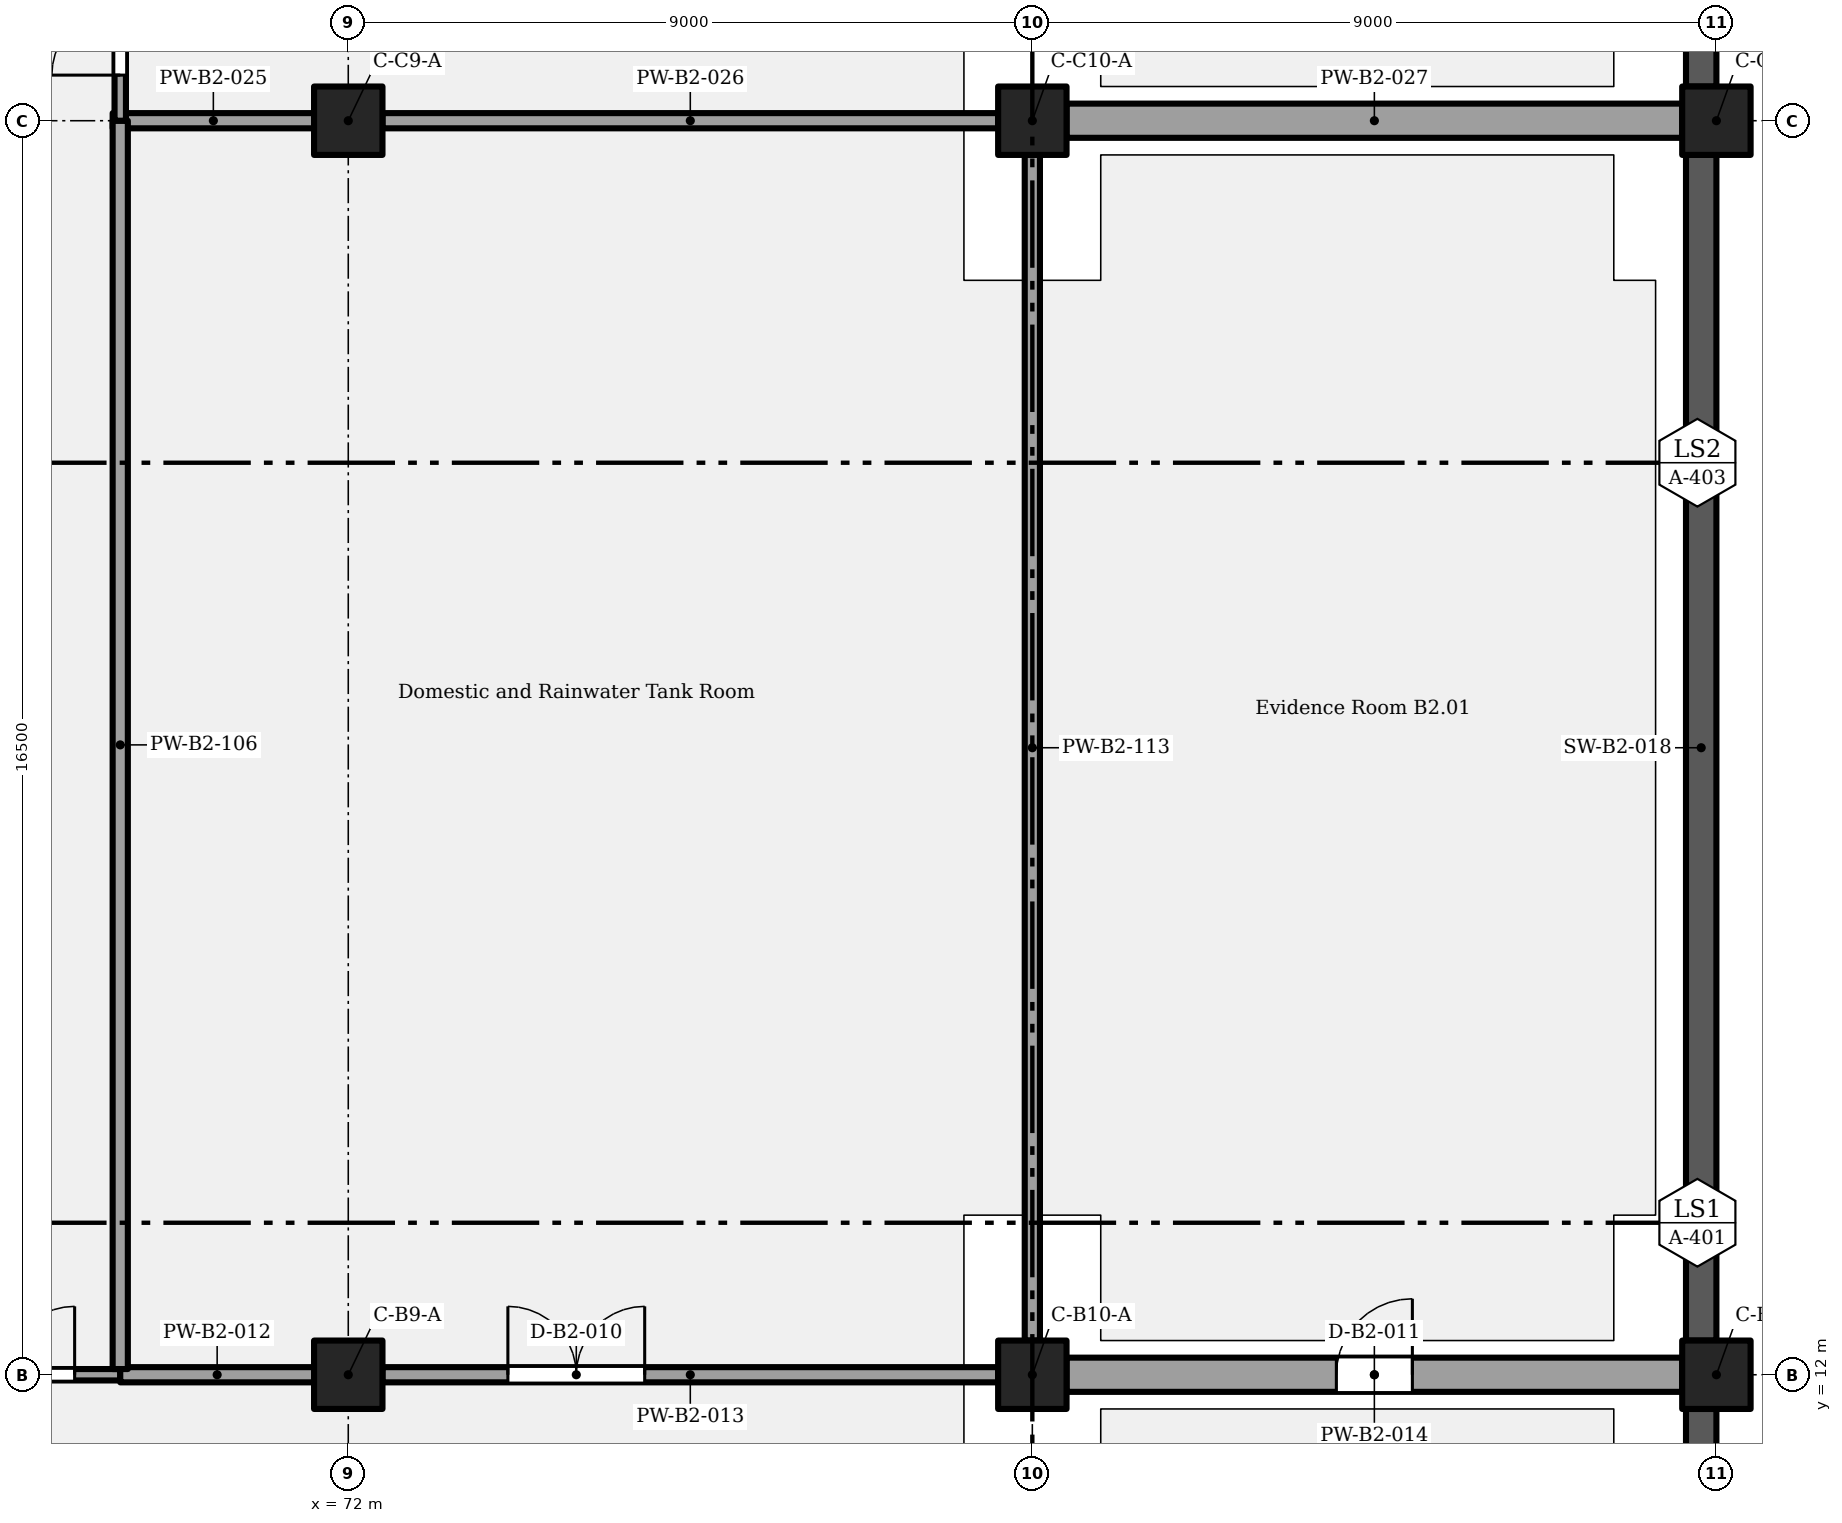
"""IFC4 building model, lengths in metres.
Left out: names, types, materials, properties, quantities, classifications, styles, units other than length and angle.
Written with IfcOpenShell. Run it as: python <this file> out.ifc"""

import sys

from ifc_helpers import new_model, si_unit, direction, frame, frame_2d, origin, origin_2d, place, context, subcontext, project, spatial, rectangle, extrude, element, fill, save


model = new_model("IFC4")
c1 = context("Model", 3, precision=1e-05, world=origin(), true_north=direction((0.0, 1.0)))
c2 = subcontext(c1, "Body", "Model", "MODEL_VIEW")
j1 = project(units=[si_unit("LENGTHUNIT", "METRE"), si_unit("PLANEANGLEUNIT", "RADIAN")], contexts=[c1])
p1 = place(None, origin())
s1 = spatial("IfcSite", under=j1, at=p1, CompositionType="ELEMENT")
p2 = place(p1, origin())
s2 = spatial("IfcBuilding", under=s1, at=p2, CompositionType="ELEMENT")
p3 = place(p2, frame((0.0, 0.0, -8.4)))
s3 = spatial("IfcBuildingStorey", under=s2, at=p3, CompositionType="ELEMENT", Elevation=-8.4)
for number, where, z_axis, x_axis in (
    (1, (72.0, 12.0, 0.0), (0.0, 0.0, 1.0), (1.0, 0.0, 0.0)),
    (2, (81.0, 12.0, 0.0), (0.0, 0.0, 1.0), (1.0, 0.0, 0.0)),
    (3, (90.0, 12.0, 0.0), (0.0, 0.0, 1.0), (1.0, 0.0, 0.0)),
    (4, (72.0, 28.5, 0.0), (0.0, 0.0, 1.0), (1.0, 0.0, 0.0)),
    (5, (81.0, 28.5, 0.0), (0.0, 0.0, 1.0), (1.0, 0.0, 0.0)),
    (6, (90.0, 28.5, 0.0), (0.0, 0.0, 1.0), (1.0, 0.0, 0.0)),
):
    element("IfcColumn", number, at=place(p3, frame(where, z_axis=z_axis, x_axis=x_axis)), inside=s3, PredefinedType="COLUMN", context=c2, shape_type="SweptSolid", body=[
        extrude(rectangle(XDim=0.9, YDim=0.9, at=origin_2d()), origin(), (0.0, 0.0, 1.0), 4.2),
    ])
p4 = place(p3, frame((89.8, 0.45, 0.0), z_axis=(0.0, 0.0, 1.0), x_axis=(0.0, 1.0, 0.0)))
e7 = element("IfcWall", 7, at=p4, inside=s3, PredefinedType="SOLIDWALL", context=c2, shape_type="SweptSolid", body=[
    extrude(rectangle(XDim=11.1, YDim=0.4, at=frame_2d((5.55, 0.0))), origin(), (0.0, 0.0, 1.0), 3.8),
])
p5 = place(p3, frame((89.8, 12.45, 0.0), z_axis=(0.0, 0.0, 1.0), x_axis=(0.0, 1.0, 0.0)))
e8 = element("IfcWall", 8, at=p5, inside=s3, PredefinedType="SOLIDWALL", context=c2, shape_type="SweptSolid", body=[
    extrude(rectangle(XDim=15.6, YDim=0.4, at=frame_2d((7.8, 0.0))), origin(), (0.0, 0.0, 1.0), 3.8),
])
p6 = place(p3, frame((89.8, 28.95, 0.0), z_axis=(0.0, 0.0, 1.0), x_axis=(0.0, 1.0, 0.0)))
e9 = element("IfcWall", 9, at=p6, inside=s3, PredefinedType="SOLIDWALL", context=c2, shape_type="SweptSolid", body=[
    extrude(rectangle(XDim=8.1, YDim=0.4, at=frame_2d((4.05, 0.0))), origin(), (0.0, 0.0, 1.0), 3.8),
])
p7 = place(p3, frame((66.0, 12.0, 0.0), z_axis=(0.0, 0.0, 1.0), x_axis=(1.0, 0.0, 0.0)))
e10 = element("IfcWall", 10, at=p7, inside=s3, PredefinedType="PARTITIONING", context=c2, shape_type="SweptSolid", body=[
    extrude(rectangle(XDim=3.0, YDim=0.15, at=frame_2d((1.5, 0.0))), origin(), (0.0, 0.0, 1.0), 3.05),
])
p8 = place(p7, frame((0.6, 0.0, 0.0)))
e11 = element("IfcOpeningElement", 11, at=p8, cuts=e10, PredefinedType="OPENING", context=c2, shape_type="SweptSolid", body=[
    extrude(rectangle(XDim=1.8, YDim=2.1, at=frame_2d((0.9, 1.05))), frame((0.0, 0.085, 0.0), z_axis=(0.0, -1.0, 0.0), x_axis=(1.0, 0.0, 0.0)), (0.0, 0.0, 1.0), 0.17),
])
p9 = place(p3, frame((69.0, 12.0, 0.0), z_axis=(0.0, 0.0, 1.0), x_axis=(1.0, 0.0, 0.0)))
e12 = element("IfcWall", 12, at=p9, inside=s3, PredefinedType="PARTITIONING", context=c2, shape_type="SweptSolid", body=[
    extrude(rectangle(XDim=2.55, YDim=0.2, at=frame_2d((1.275, 0.0))), origin(), (0.0, 0.0, 1.0), 3.05),
])
p10 = place(p3, frame((72.45, 12.0, 0.0), z_axis=(0.0, 0.0, 1.0), x_axis=(1.0, 0.0, 0.0)))
e13 = element("IfcWall", 13, at=p10, inside=s3, PredefinedType="PARTITIONING", context=c2, shape_type="SweptSolid", body=[
    extrude(rectangle(XDim=8.1, YDim=0.2, at=frame_2d((4.05, 0.0))), origin(), (0.0, 0.0, 1.0), 3.05),
])
p11 = place(p10, frame((1.65, 0.0, 0.0)))
e14 = element("IfcOpeningElement", 14, at=p11, cuts=e13, PredefinedType="OPENING", context=c2, shape_type="SweptSolid", body=[
    extrude(rectangle(XDim=1.8, YDim=2.4, at=frame_2d((0.9, 1.2))), frame((0.0, 0.11, 0.0), z_axis=(0.0, -1.0, 0.0), x_axis=(1.0, 0.0, 0.0)), (0.0, 0.0, 1.0), 0.22),
])
p12 = place(p3, frame((81.45, 12.0, 0.0), z_axis=(0.0, 0.0, 1.0), x_axis=(1.0, 0.0, 0.0)))
e15 = element("IfcWall", 15, at=p12, inside=s3, PredefinedType="PARTITIONING", context=c2, shape_type="SweptSolid", body=[
    extrude(rectangle(XDim=8.1, YDim=0.45, at=frame_2d((4.05, 0.0))), origin(), (0.0, 0.0, 1.0), 3.05),
])
p13 = place(p12, frame((3.55, 0.0, 0.0)))
e16 = element("IfcOpeningElement", 16, at=p13, cuts=e15, PredefinedType="OPENING", context=c2, shape_type="SweptSolid", body=[
    extrude(rectangle(XDim=1.0, YDim=2.1, at=frame_2d((0.5, 1.05))), frame((0.0, 0.235, 0.0), z_axis=(0.0, -1.0, 0.0), x_axis=(1.0, 0.0, 0.0)), (0.0, 0.0, 1.0), 0.47),
])
p14 = place(p3, frame((68.9, 28.5, 0.0), z_axis=(0.0, 0.0, 1.0), x_axis=(1.0, 0.0, 0.0)))
e17 = element("IfcWall", 17, at=p14, inside=s3, PredefinedType="PARTITIONING", context=c2, shape_type="SweptSolid", body=[
    extrude(rectangle(XDim=2.65, YDim=0.2, at=frame_2d((1.325, 0.0))), origin(), (0.0, 0.0, 1.0), 3.05),
])
p15 = place(p3, frame((72.45, 28.5, 0.0), z_axis=(0.0, 0.0, 1.0), x_axis=(1.0, 0.0, 0.0)))
e18 = element("IfcWall", 18, at=p15, inside=s3, PredefinedType="PARTITIONING", context=c2, shape_type="SweptSolid", body=[
    extrude(rectangle(XDim=8.1, YDim=0.2, at=frame_2d((4.05, 0.0))), origin(), (0.0, 0.0, 1.0), 3.05),
])
p16 = place(p3, frame((81.45, 28.5, 0.0), z_axis=(0.0, 0.0, 1.0), x_axis=(1.0, 0.0, 0.0)))
e19 = element("IfcWall", 19, at=p16, inside=s3, PredefinedType="PARTITIONING", context=c2, shape_type="SweptSolid", body=[
    extrude(rectangle(XDim=8.1, YDim=0.45, at=frame_2d((4.05, 0.0))), origin(), (0.0, 0.0, 1.0), 3.05),
])
p17 = place(p3, frame((69.0, 12.075, 0.0), z_axis=(0.0, 0.0, 1.0), x_axis=(0.0, 1.0, 0.0)))
e20 = element("IfcWall", 20, at=p17, inside=s3, PredefinedType="PARTITIONING", context=c2, shape_type="SweptSolid", body=[
    extrude(rectangle(XDim=16.425, YDim=0.2, at=frame_2d((8.212, 0.0))), origin(), (0.0, 0.0, 1.0), 3.8),
])
p18 = place(p3, frame((69.0, 28.5, 0.0), z_axis=(0.0, 0.0, 1.0), x_axis=(0.0, 1.0, 0.0)))
e21 = element("IfcWall", 21, at=p18, inside=s3, PredefinedType="PARTITIONING", context=c2, shape_type="SweptSolid", body=[
    extrude(rectangle(XDim=3.0, YDim=0.15, at=frame_2d((1.5, 0.0))), origin(), (0.0, 0.0, 1.0), 3.8),
])
p19 = place(p18, frame((0.6, 0.0, 0.0)))
e22 = element("IfcOpeningElement", 22, at=p19, cuts=e21, PredefinedType="OPENING", context=c2, shape_type="SweptSolid", body=[
    extrude(rectangle(XDim=1.8, YDim=2.1, at=frame_2d((0.9, 1.05))), frame((0.0, 0.085, 0.0), z_axis=(0.0, -1.0, 0.0), x_axis=(1.0, 0.0, 0.0)), (0.0, 0.0, 1.0), 0.17),
])
p20 = place(p3, frame((81.0, 12.45, 0.0), z_axis=(0.0, 0.0, 1.0), x_axis=(0.0, 1.0, 0.0)))
e23 = element("IfcWall", 23, at=p20, inside=s3, PredefinedType="PARTITIONING", context=c2, shape_type="SweptSolid", body=[
    extrude(rectangle(XDim=15.6, YDim=0.2, at=frame_2d((7.8, 0.0))), origin(), (0.0, 0.0, 1.0), 2.85),
])
p21 = place(p8, origin())
e24 = element("IfcDoor", 24, at=p21, inside=s3, OperationType="DOUBLE_DOOR_SINGLE_SWING", PredefinedType="DOOR", context=c2, shape_type="SweptSolid", body=[
    extrude(rectangle(XDim=1.8, YDim=2.1, at=frame_2d((0.9, 1.05))), frame((0.0, 0.025, 0.0), z_axis=(0.0, -1.0, 0.0), x_axis=(1.0, 0.0, 0.0)), (0.0, 0.0, 1.0), 0.05),
])
fill(e11, e24)
p22 = place(p19, origin())
e25 = element("IfcDoor", 25, at=p22, inside=s3, OperationType="DOUBLE_DOOR_SINGLE_SWING", PredefinedType="DOOR", context=c2, shape_type="SweptSolid", body=[
    extrude(rectangle(XDim=1.8, YDim=2.1, at=frame_2d((0.9, 1.05))), frame((0.0, 0.025, 0.0), z_axis=(0.0, -1.0, 0.0), x_axis=(1.0, 0.0, 0.0)), (0.0, 0.0, 1.0), 0.05),
])
fill(e22, e25)
p23 = place(p11, origin())
e26 = element("IfcDoor", 26, at=p23, inside=s3, OperationType="DOUBLE_DOOR_SINGLE_SWING", PredefinedType="DOOR", context=c2, shape_type="SweptSolid", body=[
    extrude(rectangle(XDim=1.8, YDim=2.4, at=frame_2d((0.9, 1.2))), frame((0.0, 0.025, 0.0), z_axis=(0.0, -1.0, 0.0), x_axis=(1.0, 0.0, 0.0)), (0.0, 0.0, 1.0), 0.05),
])
fill(e14, e26)
p24 = place(p13, origin())
e27 = element("IfcDoor", 27, at=p24, inside=s3, OperationType="SINGLE_SWING_RIGHT", PredefinedType="DOOR", context=c2, shape_type="SweptSolid", body=[
    extrude(rectangle(XDim=1.0, YDim=2.1, at=frame_2d((0.5, 1.05))), frame((0.0, 0.025, 0.0), z_axis=(0.0, -1.0, 0.0), x_axis=(1.0, 0.0, 0.0)), (0.0, 0.0, 1.0), 0.05),
])
fill(e16, e27)
save(model, sys.argv[1])
